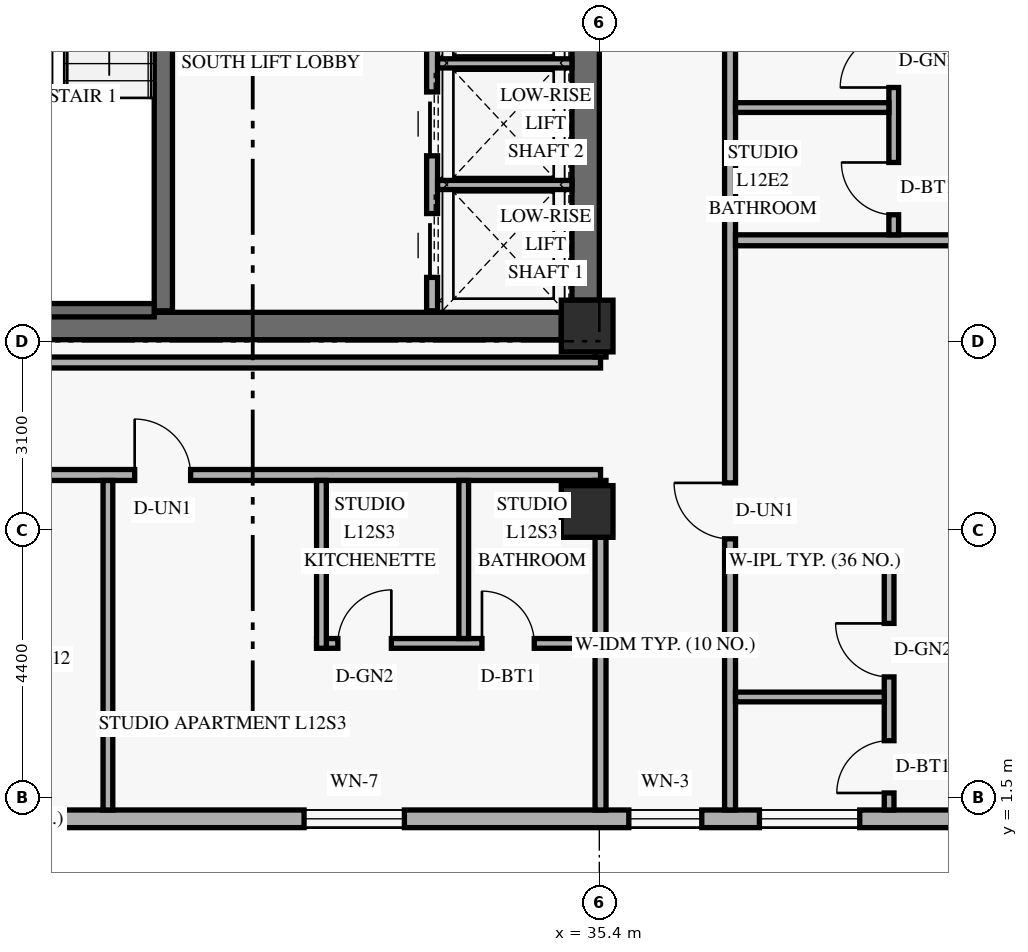
"""IFC4 building model, lengths in metres.
Left out: names, types, materials, properties, quantities, classifications, styles, units other than length and angle.
Written with IfcOpenShell. Run it as: python <this file> out.ifc"""

import sys

from ifc_helpers import new_model, si_unit, direction, frame, frame_2d, origin, origin_2d, place, context, subcontext, project, spatial, rectangle, extrude, element, fill, save


model = new_model("IFC4")
c1 = context("Model", 3, precision=1e-05, world=origin(), true_north=direction((0.0, 1.0)))
c2 = subcontext(c1, "Body", "Model", "MODEL_VIEW")
j1 = project(units=[si_unit("LENGTHUNIT", "METRE"), si_unit("PLANEANGLEUNIT", "RADIAN")], contexts=[c1])
p1 = place(None, origin())
s1 = spatial("IfcSite", under=j1, at=p1, CompositionType="ELEMENT")
p2 = place(p1, origin())
s2 = spatial("IfcBuilding", under=s1, at=p2, CompositionType="ELEMENT")
p3 = place(p2, frame((0.0, 0.0, 49.2)))
s3 = spatial("IfcBuildingStorey", under=s2, at=p3, CompositionType="ELEMENT", Elevation=49.2)
p4 = place(p3, frame((35.175, 9.675, 0.0), z_axis=(0.0, 0.0, 1.0), x_axis=(0.0, 1.0, 0.0)))
e1 = element("IfcWall", 1, at=p4, inside=s3, PredefinedType="SHEAR", context=c2, shape_type="SweptSolid", body=[
    extrude(rectangle(XDim=5.875, YDim=0.45, at=frame_2d((2.938, 0.0))), origin(), (0.0, 0.0, 1.0), 2.667),
])
p5 = place(p3, frame((24.625, 9.25, 0.0), z_axis=(0.0, 0.0, 1.0), x_axis=(1.0, 0.0, 0.0)))
e2 = element("IfcWall", 2, at=p5, inside=s3, PredefinedType="SHEAR", context=c2, shape_type="SweptSolid", body=[
    extrude(rectangle(XDim=10.15, YDim=0.45, at=frame_2d((5.075, 0.0))), origin(), (0.0, 0.0, 1.0), 3.36),
])
p6 = place(p3, frame((28.23, 9.5, 0.0), z_axis=(0.0, 0.0, 1.0), x_axis=(0.0, 1.0, 0.0)))
e3 = element("IfcWall", 3, at=p6, inside=s3, PredefinedType="SHEAR", context=c2, shape_type="SweptSolid", body=[
    extrude(rectangle(XDim=7.76, YDim=0.3, at=frame_2d((3.88, 0.0))), origin(), (0.0, 0.0, 1.0), 3.36),
])
p7 = place(p3, frame((24.92, 9.51, 0.0), z_axis=(0.0, 0.0, 1.0), x_axis=(1.0, 0.0, 0.0)))
e4 = element("IfcWall", 4, at=p7, inside=s3, PredefinedType="SHEAR", context=c2, shape_type="SweptSolid", body=[
    extrude(rectangle(XDim=3.16, YDim=0.22, at=frame_2d((1.58, 0.0))), origin(), (0.0, 0.0, 1.0), 3.36),
])
for number, where, z_axis, x_axis in (
    (5, (35.2, 6.2, 0.0), (0.0, 0.0, 1.0), (1.0, 0.0, 0.0)),
    (6, (35.2, 9.25, 0.0), (0.0, 0.0, 1.0), (1.0, 0.0, 0.0)),
):
    element("IfcColumn", number, at=place(p3, frame(where, z_axis=z_axis, x_axis=x_axis)), inside=s3, PredefinedType="COLUMN", context=c2, shape_type="SweptSolid", body=[
        extrude(rectangle(XDim=0.85, YDim=0.85, at=origin_2d()), origin(), (0.0, 0.0, 1.0), 3.6),
    ])
p8 = place(p3, frame((5.42, 1.145, 0.0), z_axis=(0.0, 0.0, 1.0), x_axis=(1.0, 0.0, 0.0)))
e7 = element("IfcWall", 7, at=p8, inside=s3, PredefinedType="SOLIDWALL", context=c2, shape_type="SweptSolid", body=[
    extrude(rectangle(XDim=39.56, YDim=0.29, at=frame_2d((19.78, 0.0))), origin(), (0.0, 0.0, 1.0), 3.36),
])
p9 = place(p8, frame((2.615, 0.0, 0.85)))
e8 = element("IfcOpeningElement", 8, at=p9, cuts=e7, PredefinedType="OPENING", context=c2, shape_type="SweptSolid", body=[
    extrude(rectangle(XDim=1.65, YDim=1.6, at=frame_2d((0.825, 0.8))), frame((0.0, 0.155, 0.0), z_axis=(0.0, -1.0, 0.0), x_axis=(1.0, 0.0, 0.0)), (0.0, 0.0, 1.0), 0.31),
])
p10 = place(p8, frame((7.18, 0.0, 0.85)))
e9 = element("IfcOpeningElement", 9, at=p10, cuts=e7, PredefinedType="OPENING", context=c2, shape_type="SweptSolid", body=[
    extrude(rectangle(XDim=1.2, YDim=1.5, at=frame_2d((0.6, 0.75))), frame((0.0, 0.155, 0.0), z_axis=(0.0, -1.0, 0.0), x_axis=(1.0, 0.0, 0.0)), (0.0, 0.0, 1.0), 0.31),
])
p11 = place(p8, frame((11.906, 0.0, 0.85)))
e10 = element("IfcOpeningElement", 10, at=p11, cuts=e7, PredefinedType="OPENING", context=c2, shape_type="SweptSolid", body=[
    extrude(rectangle(XDim=1.65, YDim=1.6, at=frame_2d((0.825, 0.8))), frame((0.0, 0.155, 0.0), z_axis=(0.0, -1.0, 0.0), x_axis=(1.0, 0.0, 0.0)), (0.0, 0.0, 1.0), 0.31),
])
p12 = place(p8, frame((18.515, 0.0, 0.85)))
e11 = element("IfcOpeningElement", 11, at=p12, cuts=e7, PredefinedType="OPENING", context=c2, shape_type="SweptSolid", body=[
    extrude(rectangle(XDim=1.65, YDim=1.6, at=frame_2d((0.825, 0.8))), frame((0.0, 0.155, 0.0), z_axis=(0.0, -1.0, 0.0), x_axis=(1.0, 0.0, 0.0)), (0.0, 0.0, 1.0), 0.31),
])
p13 = place(p8, frame((25.124, 0.0, 0.85)))
e12 = element("IfcOpeningElement", 12, at=p13, cuts=e7, PredefinedType="OPENING", context=c2, shape_type="SweptSolid", body=[
    extrude(rectangle(XDim=1.65, YDim=1.6, at=frame_2d((0.825, 0.8))), frame((0.0, 0.155, 0.0), z_axis=(0.0, -1.0, 0.0), x_axis=(1.0, 0.0, 0.0)), (0.0, 0.0, 1.0), 0.31),
])
p14 = place(p8, frame((30.465, 0.0, 0.85)))
e13 = element("IfcOpeningElement", 13, at=p14, cuts=e7, PredefinedType="OPENING", context=c2, shape_type="SweptSolid", body=[
    extrude(rectangle(XDim=1.2, YDim=1.5, at=frame_2d((0.6, 0.75))), frame((0.0, 0.155, 0.0), z_axis=(0.0, -1.0, 0.0), x_axis=(1.0, 0.0, 0.0)), (0.0, 0.0, 1.0), 0.31),
])
p15 = place(p8, frame((32.613, 0.0, 0.85)))
e14 = element("IfcOpeningElement", 14, at=p15, cuts=e7, PredefinedType="OPENING", context=c2, shape_type="SweptSolid", body=[
    extrude(rectangle(XDim=1.65, YDim=1.6, at=frame_2d((0.825, 0.8))), frame((0.0, 0.155, 0.0), z_axis=(0.0, -1.0, 0.0), x_axis=(1.0, 0.0, 0.0)), (0.0, 0.0, 1.0), 0.31),
])
p16 = place(p8, frame((36.328, 0.0, 0.85)))
e15 = element("IfcOpeningElement", 15, at=p16, cuts=e7, PredefinedType="OPENING", context=c2, shape_type="SweptSolid", body=[
    extrude(rectangle(XDim=1.65, YDim=1.6, at=frame_2d((0.825, 0.8))), frame((0.0, 0.155, 0.0), z_axis=(0.0, -1.0, 0.0), x_axis=(1.0, 0.0, 0.0)), (0.0, 0.0, 1.0), 0.31),
])
p17 = place(p3, frame((32.65, 9.5, 0.0), z_axis=(0.0, 0.0, 1.0), x_axis=(0.0, 1.0, 0.0)))
e16 = element("IfcWall", 16, at=p17, inside=s3, PredefinedType="STANDARD", context=c2, shape_type="SweptSolid", body=[
    extrude(rectangle(XDim=6.08, YDim=0.18, at=frame_2d((3.04, 0.0))), origin(), (0.0, 0.0, 1.0), 3.36),
])
p18 = place(p17, frame((0.55, 0.0, 0.0)))
e17 = element("IfcOpeningElement", 17, at=p18, cuts=e16, PredefinedType="OPENING", context=c2, shape_type="SweptSolid", body=[
    extrude(rectangle(XDim=1.05, YDim=2.2, at=frame_2d((0.525, 1.1))), frame((0.0, 0.1, 0.0), z_axis=(0.0, -1.0, 0.0), x_axis=(1.0, 0.0, 0.0)), (0.0, 0.0, 1.0), 0.2),
])
p19 = place(p17, frame((2.55, 0.0, 0.0)))
e18 = element("IfcOpeningElement", 18, at=p19, cuts=e16, PredefinedType="OPENING", context=c2, shape_type="SweptSolid", body=[
    extrude(rectangle(XDim=1.05, YDim=2.2, at=frame_2d((0.525, 1.1))), frame((0.0, 0.1, 0.0), z_axis=(0.0, -1.0, 0.0), x_axis=(1.0, 0.0, 0.0)), (0.0, 0.0, 1.0), 0.2),
])
p20 = place(p17, frame((4.55, 0.0, 0.0)))
e19 = element("IfcOpeningElement", 19, at=p20, cuts=e16, PredefinedType="OPENING", context=c2, shape_type="SweptSolid", body=[
    extrude(rectangle(XDim=1.05, YDim=2.2, at=frame_2d((0.525, 1.1))), frame((0.0, 0.1, 0.0), z_axis=(0.0, -1.0, 0.0), x_axis=(1.0, 0.0, 0.0)), (0.0, 0.0, 1.0), 0.2),
])
for number, where, z_axis, x_axis in (
    (20, (32.74, 11.57, 0.0), (0.0, 0.0, 1.0), (1.0, 0.0, 0.0)),
    (21, (32.74, 13.57, 0.0), (0.0, 0.0, 1.0), (1.0, 0.0, 0.0)),
):
    element("IfcWall", number, at=place(p3, frame(where, z_axis=z_axis, x_axis=x_axis)), inside=s3, PredefinedType="STANDARD", context=c2, shape_type="SweptSolid", body=[
        extrude(rectangle(XDim=2.21, YDim=0.15, at=frame_2d((1.105, 0.0))), origin(), (0.0, 0.0, 1.0), 3.36),
    ])
p21 = place(p3, frame((37.55, 1.29, 0.0), z_axis=(0.0, 0.0, 1.0), x_axis=(0.0, 1.0, 0.0)))
e22 = element("IfcWall", 22, at=p21, inside=s3, PredefinedType="STANDARD", context=c2, shape_type="SweptSolid", body=[
    extrude(rectangle(XDim=45.42, YDim=0.18, at=frame_2d((22.71, 0.0))), origin(), (0.0, 0.0, 1.0), 2.649),
])
p22 = place(p21, frame((4.46, 0.0, 0.0)))
e23 = element("IfcOpeningElement", 23, at=p22, cuts=e22, PredefinedType="OPENING", context=c2, shape_type="SweptSolid", body=[
    extrude(rectangle(XDim=0.92, YDim=2.15, at=frame_2d((0.46, 1.075))), frame((0.0, 0.1, 0.0), z_axis=(0.0, -1.0, 0.0), x_axis=(1.0, 0.0, 0.0)), (0.0, 0.0, 1.0), 0.2),
])
p23 = place(p21, frame((14.37, 0.0, 0.0)))
e24 = element("IfcOpeningElement", 24, at=p23, cuts=e22, PredefinedType="OPENING", context=c2, shape_type="SweptSolid", body=[
    extrude(rectangle(XDim=0.92, YDim=2.15, at=frame_2d((0.46, 1.075))), frame((0.0, 0.1, 0.0), z_axis=(0.0, -1.0, 0.0), x_axis=(1.0, 0.0, 0.0)), (0.0, 0.0, 1.0), 0.2),
])
p24 = place(p21, frame((25.87, 0.0, 0.0)))
e25 = element("IfcOpeningElement", 25, at=p24, cuts=e22, PredefinedType="OPENING", context=c2, shape_type="SweptSolid", body=[
    extrude(rectangle(XDim=0.92, YDim=2.15, at=frame_2d((0.46, 1.075))), frame((0.0, 0.1, 0.0), z_axis=(0.0, -1.0, 0.0), x_axis=(1.0, 0.0, 0.0)), (0.0, 0.0, 1.0), 0.2),
])
p25 = place(p21, frame((40.02, 0.0, 0.0)))
e26 = element("IfcOpeningElement", 26, at=p25, cuts=e22, PredefinedType="OPENING", context=c2, shape_type="SweptSolid", body=[
    extrude(rectangle(XDim=0.92, YDim=2.15, at=frame_2d((0.46, 1.075))), frame((0.0, 0.1, 0.0), z_axis=(0.0, -1.0, 0.0), x_axis=(1.0, 0.0, 0.0)), (0.0, 0.0, 1.0), 0.2),
])
p26 = place(p3, frame((14.1, 6.8, 0.0), z_axis=(0.0, 0.0, 1.0), x_axis=(1.0, 0.0, 0.0)))
e27 = element("IfcWall", 27, at=p26, inside=s3, PredefinedType="STANDARD", context=c2, shape_type="SweptSolid", body=[
    extrude(rectangle(XDim=21.32, YDim=0.18, at=frame_2d((10.66, 0.0))), origin(), (0.0, 0.0, 1.0), 2.649),
])
p27 = place(p26, frame((0.44, 0.0, 0.0)))
e28 = element("IfcOpeningElement", 28, at=p27, cuts=e27, PredefinedType="OPENING", context=c2, shape_type="SweptSolid", body=[
    extrude(rectangle(XDim=0.92, YDim=2.15, at=frame_2d((0.46, 1.075))), frame((0.0, 0.1, 0.0), z_axis=(0.0, -1.0, 0.0), x_axis=(1.0, 0.0, 0.0)), (0.0, 0.0, 1.0), 0.2),
])
p28 = place(p26, frame((8.582, 0.0, 0.0)))
e29 = element("IfcOpeningElement", 29, at=p28, cuts=e27, PredefinedType="OPENING", context=c2, shape_type="SweptSolid", body=[
    extrude(rectangle(XDim=0.95, YDim=2.15, at=frame_2d((0.475, 1.075))), frame((0.0, 0.1, 0.0), z_axis=(0.0, -1.0, 0.0), x_axis=(1.0, 0.0, 0.0)), (0.0, 0.0, 1.0), 0.2),
])
p29 = place(p26, frame((13.658, 0.0, 0.0)))
e30 = element("IfcOpeningElement", 30, at=p29, cuts=e27, PredefinedType="OPENING", context=c2, shape_type="SweptSolid", body=[
    extrude(rectangle(XDim=0.92, YDim=2.15, at=frame_2d((0.46, 1.075))), frame((0.0, 0.1, 0.0), z_axis=(0.0, -1.0, 0.0), x_axis=(1.0, 0.0, 0.0)), (0.0, 0.0, 1.0), 0.2),
])
p30 = place(p3, frame((23.75, 8.65, 0.0), z_axis=(0.0, 0.0, 1.0), x_axis=(1.0, 0.0, 0.0)))
e31 = element("IfcWall", 31, at=p30, inside=s3, PredefinedType="STANDARD", context=c2, shape_type="SweptSolid", body=[
    extrude(rectangle(XDim=11.67, YDim=0.18, at=frame_2d((5.835, 0.0))), origin(), (0.0, 0.0, 1.0), 2.649),
])
p31 = place(p3, frame((35.42, 1.29, 0.0), z_axis=(0.0, 0.0, 1.0), x_axis=(0.0, 1.0, 0.0)))
e32 = element("IfcWall", 32, at=p31, inside=s3, PredefinedType="PARTITIONING", context=c2, shape_type="SweptSolid", body=[
    extrude(rectangle(XDim=5.42, YDim=0.18, at=frame_2d((2.71, 0.0))), origin(), (0.0, 0.0, 1.0), 3.36),
])
p32 = place(p3, frame((35.42, 8.74, 0.0), z_axis=(0.0, 0.0, 1.0), x_axis=(0.0, 1.0, 0.0)))
e33 = element("IfcWall", 33, at=p32, inside=s3, PredefinedType="STANDARD", context=c2, shape_type="SweptSolid", body=[
    extrude(rectangle(XDim=0.51, YDim=0.18, at=frame_2d((0.255, 0.0))), origin(), (0.0, 0.0, 1.0), 3.36),
])
p33 = place(p3, frame((37.64, 5.39, 0.0), z_axis=(0.0, 0.0, 1.0), x_axis=(1.0, 0.0, 0.0)))
e34 = element("IfcWall", 34, at=p33, inside=s3, PredefinedType="PLUMBINGWALL", context=c2, shape_type="SweptSolid", body=[
    extrude(rectangle(XDim=2.606, YDim=0.16, at=frame_2d((1.303, 0.0))), origin(), (0.0, 0.0, 1.0), 3.36),
])
p34 = place(p3, frame((40.166, 1.29, 0.0), z_axis=(0.0, 0.0, 1.0), x_axis=(0.0, 1.0, 0.0)))
e35 = element("IfcWall", 35, at=p34, inside=s3, PredefinedType="PLUMBINGWALL", context=c2, shape_type="SweptSolid", body=[
    extrude(rectangle(XDim=4.19, YDim=0.16, at=frame_2d((2.095, 0.0))), origin(), (0.0, 0.0, 1.0), 3.36),
])
p35 = place(p34, frame((0.28, 0.0, 0.0)))
e36 = element("IfcOpeningElement", 36, at=p35, cuts=e35, PredefinedType="OPENING", context=c2, shape_type="SweptSolid", body=[
    extrude(rectangle(XDim=0.86, YDim=2.12, at=frame_2d((0.43, 1.06))), frame((0.0, 0.09, 0.0), z_axis=(0.0, -1.0, 0.0), x_axis=(1.0, 0.0, 0.0)), (0.0, 0.0, 1.0), 0.18),
])
p36 = place(p34, frame((2.189, 0.0, 0.0)))
e37 = element("IfcOpeningElement", 37, at=p36, cuts=e35, PredefinedType="OPENING", context=c2, shape_type="SweptSolid", body=[
    extrude(rectangle(XDim=0.88, YDim=2.12, at=frame_2d((0.44, 1.06))), frame((0.0, 0.09, 0.0), z_axis=(0.0, -1.0, 0.0), x_axis=(1.0, 0.0, 0.0)), (0.0, 0.0, 1.0), 0.18),
])
p37 = place(p3, frame((37.64, 3.149, 0.0), z_axis=(0.0, 0.0, 1.0), x_axis=(1.0, 0.0, 0.0)))
e38 = element("IfcWall", 38, at=p37, inside=s3, PredefinedType="PLUMBINGWALL", context=c2, shape_type="SweptSolid", body=[
    extrude(rectangle(XDim=2.446, YDim=0.16, at=frame_2d((1.223, 0.0))), origin(), (0.0, 0.0, 1.0), 3.36),
])
p38 = place(p3, frame((37.64, 10.66, 0.0), z_axis=(0.0, 0.0, 1.0), x_axis=(1.0, 0.0, 0.0)))
e39 = element("IfcWall", 39, at=p38, inside=s3, PredefinedType="PARTITIONING", context=c2, shape_type="SweptSolid", body=[
    extrude(rectangle(XDim=10.67, YDim=0.18, at=frame_2d((5.335, 0.0))), origin(), (0.0, 0.0, 1.0), 2.649),
])
p39 = place(p3, frame((40.242, 10.75, 0.0), z_axis=(0.0, 0.0, 1.0), x_axis=(0.0, 1.0, 0.0)))
e40 = element("IfcWall", 40, at=p39, inside=s3, PredefinedType="PLUMBINGWALL", context=c2, shape_type="SweptSolid", body=[
    extrude(rectangle(XDim=4.64, YDim=0.16, at=frame_2d((2.32, 0.0))), origin(), (0.0, 0.0, 1.0), 2.932),
])
p40 = place(p39, frame((0.33, 0.0, 0.0)))
e41 = element("IfcOpeningElement", 41, at=p40, cuts=e40, PredefinedType="OPENING", context=c2, shape_type="SweptSolid", body=[
    extrude(rectangle(XDim=0.86, YDim=2.12, at=frame_2d((0.43, 1.06))), frame((0.0, 0.09, 0.0), z_axis=(0.0, -1.0, 0.0), x_axis=(1.0, 0.0, 0.0)), (0.0, 0.0, 1.0), 0.18),
])
p41 = place(p39, frame((2.423, 0.0, 0.0)))
e42 = element("IfcOpeningElement", 42, at=p41, cuts=e40, PredefinedType="OPENING", context=c2, shape_type="SweptSolid", body=[
    extrude(rectangle(XDim=0.88, YDim=2.12, at=frame_2d((0.44, 1.06))), frame((0.0, 0.09, 0.0), z_axis=(0.0, -1.0, 0.0), x_axis=(1.0, 0.0, 0.0)), (0.0, 0.0, 1.0), 0.18),
])
p42 = place(p3, frame((37.64, 12.843, 0.0), z_axis=(0.0, 0.0, 1.0), x_axis=(1.0, 0.0, 0.0)))
e43 = element("IfcWall", 43, at=p42, inside=s3, PredefinedType="PLUMBINGWALL", context=c2, shape_type="SweptSolid", body=[
    extrude(rectangle(XDim=2.522, YDim=0.16, at=frame_2d((1.261, 0.0))), origin(), (0.0, 0.0, 1.0), 3.36),
])
p43 = place(p3, frame((27.318, 1.29, 0.0), z_axis=(0.0, 0.0, 1.0), x_axis=(0.0, 1.0, 0.0)))
e44 = element("IfcWall", 44, at=p43, inside=s3, PredefinedType="PARTITIONING", context=c2, shape_type="SweptSolid", body=[
    extrude(rectangle(XDim=5.42, YDim=0.16, at=frame_2d((2.71, 0.0))), origin(), (0.0, 0.0, 1.0), 2.809),
])
p44 = place(p3, frame((30.75, 4.03, 0.0), z_axis=(0.0, 0.0, 1.0), x_axis=(1.0, 0.0, 0.0)))
e45 = element("IfcWall", 45, at=p44, inside=s3, PredefinedType="PLUMBINGWALL", context=c2, shape_type="SweptSolid", body=[
    extrude(rectangle(XDim=4.58, YDim=0.16, at=frame_2d((2.29, 0.0))), origin(), (0.0, 0.0, 1.0), 3.36),
])
p45 = place(p44, frame((0.35, 0.0, 0.0)))
e46 = element("IfcOpeningElement", 46, at=p45, cuts=e45, PredefinedType="OPENING", context=c2, shape_type="SweptSolid", body=[
    extrude(rectangle(XDim=0.88, YDim=2.12, at=frame_2d((0.44, 1.06))), frame((0.0, 0.09, 0.0), z_axis=(0.0, -1.0, 0.0), x_axis=(1.0, 0.0, 0.0)), (0.0, 0.0, 1.0), 0.18),
])
p46 = place(p44, frame((2.72, 0.0, 0.0)))
e47 = element("IfcOpeningElement", 47, at=p46, cuts=e45, PredefinedType="OPENING", context=c2, shape_type="SweptSolid", body=[
    extrude(rectangle(XDim=0.86, YDim=2.12, at=frame_2d((0.43, 1.06))), frame((0.0, 0.09, 0.0), z_axis=(0.0, -1.0, 0.0), x_axis=(1.0, 0.0, 0.0)), (0.0, 0.0, 1.0), 0.18),
])
p47 = place(p3, frame((30.83, 3.95, 0.0), z_axis=(0.0, 0.0, 1.0), x_axis=(0.0, 1.0, 0.0)))
e48 = element("IfcWall", 48, at=p47, inside=s3, PredefinedType="PLUMBINGWALL", context=c2, shape_type="SweptSolid", body=[
    extrude(rectangle(XDim=2.76, YDim=0.16, at=frame_2d((1.38, 0.0))), origin(), (0.0, 0.0, 1.0), 2.809),
])
p48 = place(p3, frame((33.17, 4.11, 0.0), z_axis=(0.0, 0.0, 1.0), x_axis=(0.0, 1.0, 0.0)))
e49 = element("IfcWall", 49, at=p48, inside=s3, PredefinedType="PLUMBINGWALL", context=c2, shape_type="SweptSolid", body=[
    extrude(rectangle(XDim=2.6, YDim=0.16, at=frame_2d((1.3, 0.0))), origin(), (0.0, 0.0, 1.0), 2.809),
])
p49 = place(p13, origin())
e50 = element("IfcWindow", 50, at=p49, inside=s3, PartitioningType="SINGLE_PANEL", PredefinedType="WINDOW", context=c2, shape_type="SweptSolid", body=[
    extrude(rectangle(XDim=1.65, YDim=1.6, at=frame_2d((0.825, 0.8))), frame((0.0, 0.03, 0.0), z_axis=(0.0, -1.0, 0.0), x_axis=(1.0, 0.0, 0.0)), (0.0, 0.0, 1.0), 0.06),
])
fill(e12, e50)
p50 = place(p14, origin())
e51 = element("IfcWindow", 51, at=p50, inside=s3, PartitioningType="SINGLE_PANEL", PredefinedType="WINDOW", context=c2, shape_type="SweptSolid", body=[
    extrude(rectangle(XDim=1.2, YDim=1.5, at=frame_2d((0.6, 0.75))), frame((0.0, 0.03, 0.0), z_axis=(0.0, -1.0, 0.0), x_axis=(1.0, 0.0, 0.0)), (0.0, 0.0, 1.0), 0.06),
])
fill(e13, e51)
p51 = place(p15, origin())
e52 = element("IfcWindow", 52, at=p51, inside=s3, PartitioningType="SINGLE_PANEL", PredefinedType="WINDOW", context=c2, shape_type="SweptSolid", body=[
    extrude(rectangle(XDim=1.65, YDim=1.6, at=frame_2d((0.825, 0.8))), frame((0.0, 0.03, 0.0), z_axis=(0.0, -1.0, 0.0), x_axis=(1.0, 0.0, 0.0)), (0.0, 0.0, 1.0), 0.06),
])
fill(e14, e52)
p52 = place(p18, origin())
e53 = element("IfcDoor", 53, at=p52, inside=s3, OperationType="SLIDING_TO_LEFT", PredefinedType="DOOR", context=c2, shape_type="SweptSolid", body=[
    extrude(rectangle(XDim=1.05, YDim=2.2, at=frame_2d((0.525, 1.1))), frame((0.0, 0.025, 0.0), z_axis=(0.0, -1.0, 0.0), x_axis=(1.0, 0.0, 0.0)), (0.0, 0.0, 1.0), 0.05),
])
fill(e17, e53)
p53 = place(p19, origin())
e54 = element("IfcDoor", 54, at=p53, inside=s3, OperationType="SLIDING_TO_LEFT", PredefinedType="DOOR", context=c2, shape_type="SweptSolid", body=[
    extrude(rectangle(XDim=1.05, YDim=2.2, at=frame_2d((0.525, 1.1))), frame((0.0, 0.025, 0.0), z_axis=(0.0, -1.0, 0.0), x_axis=(1.0, 0.0, 0.0)), (0.0, 0.0, 1.0), 0.05),
])
fill(e18, e54)
p54 = place(p22, origin())
e55 = element("IfcDoor", 55, at=p54, inside=s3, OperationType="SINGLE_SWING_RIGHT", PredefinedType="DOOR", context=c2, shape_type="SweptSolid", body=[
    extrude(rectangle(XDim=0.92, YDim=2.15, at=frame_2d((0.46, 1.075))), frame((0.0, 0.025, 0.0), z_axis=(0.0, -1.0, 0.0), x_axis=(1.0, 0.0, 0.0)), (0.0, 0.0, 1.0), 0.05),
])
fill(e23, e55)
p55 = place(p35, origin())
e56 = element("IfcDoor", 56, at=p55, inside=s3, OperationType="SINGLE_SWING_LEFT", PredefinedType="DOOR", context=c2, shape_type="SweptSolid", body=[
    extrude(rectangle(XDim=0.86, YDim=2.12, at=frame_2d((0.43, 1.06))), frame((0.0, 0.025, 0.0), z_axis=(0.0, -1.0, 0.0), x_axis=(1.0, 0.0, 0.0)), (0.0, 0.0, 1.0), 0.05),
])
fill(e36, e56)
p56 = place(p36, origin())
e57 = element("IfcDoor", 57, at=p56, inside=s3, OperationType="SINGLE_SWING_RIGHT", PredefinedType="DOOR", context=c2, shape_type="SweptSolid", body=[
    extrude(rectangle(XDim=0.88, YDim=2.12, at=frame_2d((0.44, 1.06))), frame((0.0, 0.025, 0.0), z_axis=(0.0, -1.0, 0.0), x_axis=(1.0, 0.0, 0.0)), (0.0, 0.0, 1.0), 0.05),
])
fill(e37, e57)
p57 = place(p40, origin())
e58 = element("IfcDoor", 58, at=p57, inside=s3, OperationType="SINGLE_SWING_RIGHT", PredefinedType="DOOR", context=c2, shape_type="SweptSolid", body=[
    extrude(rectangle(XDim=0.86, YDim=2.12, at=frame_2d((0.43, 1.06))), frame((0.0, 0.025, 0.0), z_axis=(0.0, -1.0, 0.0), x_axis=(1.0, 0.0, 0.0)), (0.0, 0.0, 1.0), 0.05),
])
fill(e41, e58)
p58 = place(p41, origin())
e59 = element("IfcDoor", 59, at=p58, inside=s3, OperationType="SINGLE_SWING_LEFT", PredefinedType="DOOR", context=c2, shape_type="SweptSolid", body=[
    extrude(rectangle(XDim=0.88, YDim=2.12, at=frame_2d((0.44, 1.06))), frame((0.0, 0.025, 0.0), z_axis=(0.0, -1.0, 0.0), x_axis=(1.0, 0.0, 0.0)), (0.0, 0.0, 1.0), 0.05),
])
fill(e42, e59)
p59 = place(p29, origin())
e60 = element("IfcDoor", 60, at=p59, inside=s3, OperationType="SINGLE_SWING_LEFT", PredefinedType="DOOR", context=c2, shape_type="SweptSolid", body=[
    extrude(rectangle(XDim=0.92, YDim=2.15, at=frame_2d((0.46, 1.075))), frame((0.0, 0.025, 0.0), z_axis=(0.0, -1.0, 0.0), x_axis=(1.0, 0.0, 0.0)), (0.0, 0.0, 1.0), 0.05),
])
fill(e30, e60)
p60 = place(p45, origin())
e61 = element("IfcDoor", 61, at=p60, inside=s3, OperationType="SINGLE_SWING_RIGHT", PredefinedType="DOOR", context=c2, shape_type="SweptSolid", body=[
    extrude(rectangle(XDim=0.88, YDim=2.12, at=frame_2d((0.44, 1.06))), frame((0.0, 0.025, 0.0), z_axis=(0.0, -1.0, 0.0), x_axis=(1.0, 0.0, 0.0)), (0.0, 0.0, 1.0), 0.05),
])
fill(e46, e61)
p61 = place(p46, origin())
e62 = element("IfcDoor", 62, at=p61, inside=s3, OperationType="SINGLE_SWING_LEFT", PredefinedType="DOOR", context=c2, shape_type="SweptSolid", body=[
    extrude(rectangle(XDim=0.86, YDim=2.12, at=frame_2d((0.43, 1.06))), frame((0.0, 0.025, 0.0), z_axis=(0.0, -1.0, 0.0), x_axis=(1.0, 0.0, 0.0)), (0.0, 0.0, 1.0), 0.05),
])
fill(e47, e62)
save(model, sys.argv[1])
